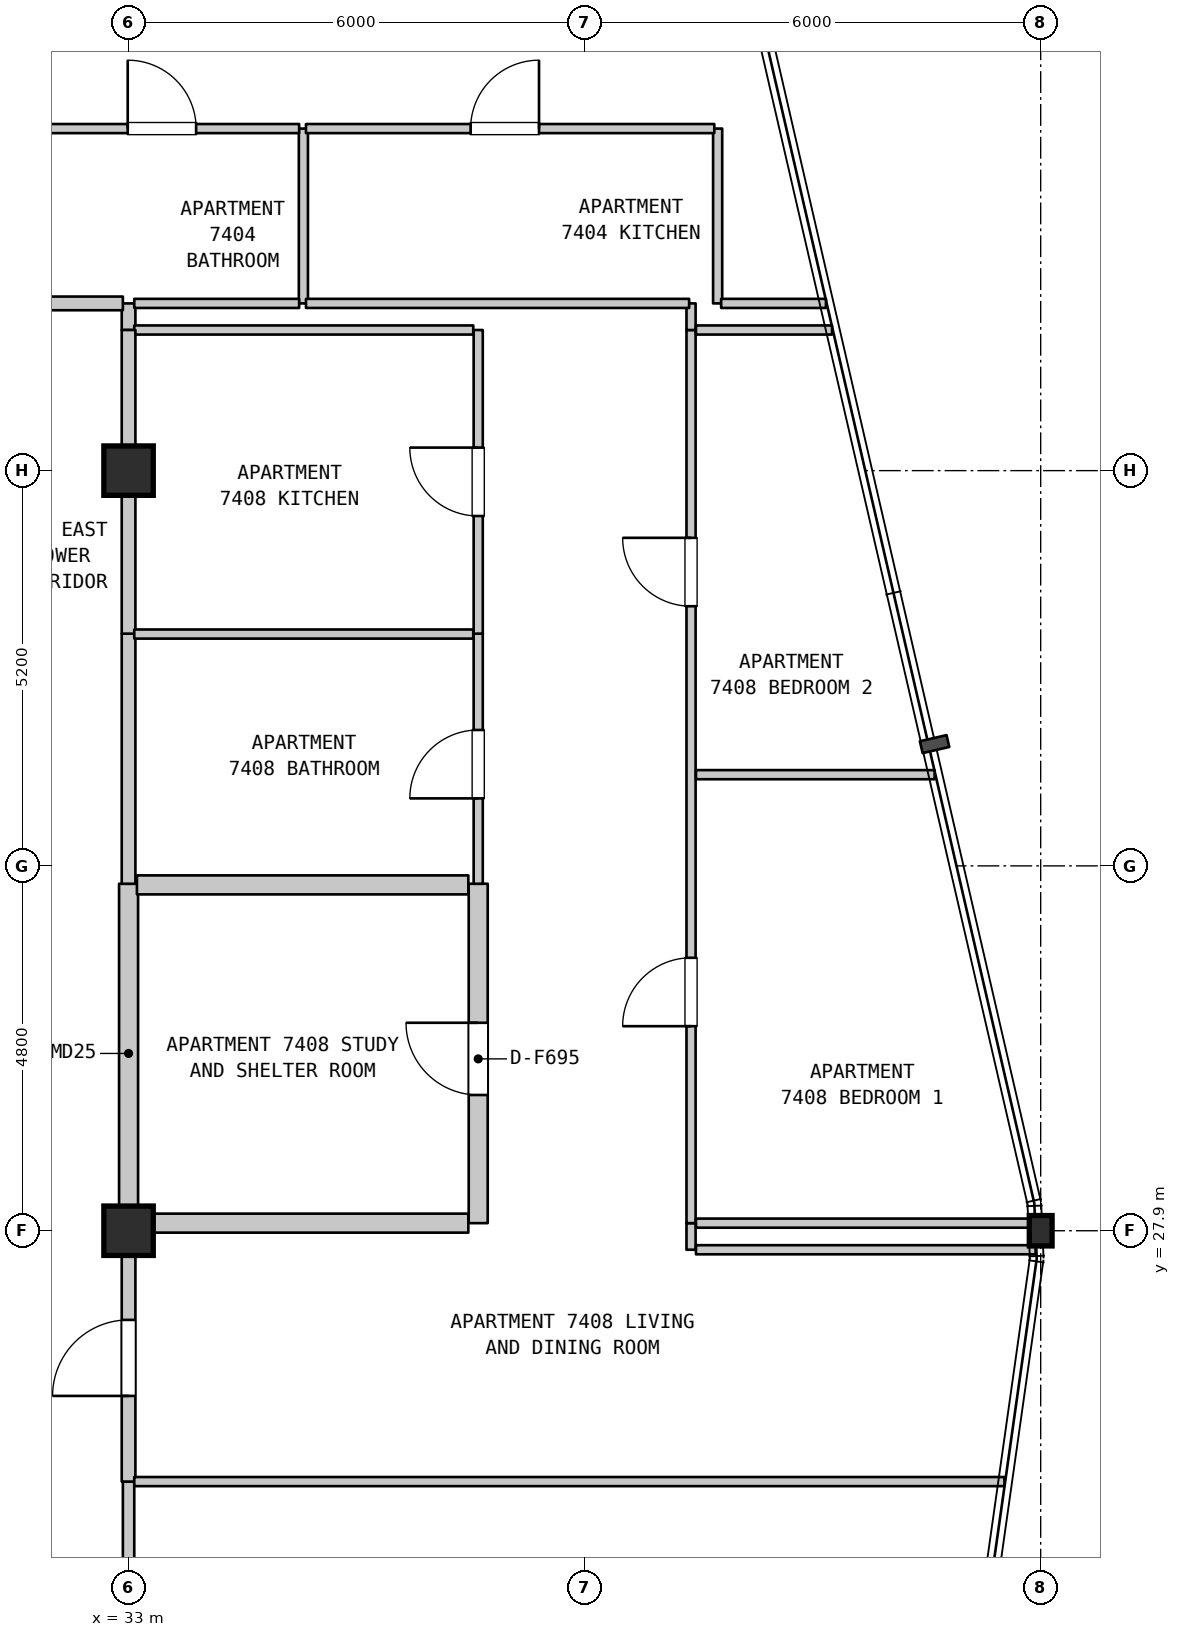
"""IFC4 building model, lengths in metres.
Left out: names, types, materials, properties, quantities, classifications, styles, units other than length and angle.
Written with IfcOpenShell. Run it as: python <this file> out.ifc"""

import sys

from ifc_helpers import new_model, si_unit, direction, frame, frame_2d, origin, origin_2d, place, context, subcontext, project, spatial, rectangle, i_section, extrude, element, fill, save


model = new_model("IFC4")
c1 = context("Model", 3, precision=1e-05, world=origin(), true_north=direction((0.0, 1.0)))
c2 = subcontext(c1, "Body", "Model", "MODEL_VIEW")
j1 = project(units=[si_unit("LENGTHUNIT", "METRE"), si_unit("PLANEANGLEUNIT", "RADIAN")], contexts=[c1])
p1 = place(None, origin())
s1 = spatial("IfcSite", under=j1, at=p1, CompositionType="ELEMENT")
p2 = place(p1, origin())
s2 = spatial("IfcBuilding", under=s1, at=p2, CompositionType="ELEMENT")
p3 = place(p2, frame((0.0, 0.0, 295.4)))
s3 = spatial("IfcBuildingStorey", under=s2, at=p3, CompositionType="ELEMENT", Elevation=295.4)
for number, where, z_axis, x_axis in (
    (1, (33.0, 27.9, 0.0), (0.0, 0.0, 1.0), (1.0, 0.0, 0.0)),
    (2, (33.0, 37.9, 0.0), (0.0, 0.0, 1.0), (1.0, 0.0, 0.0)),
):
    element("IfcColumn", number, at=place(p3, frame(where, z_axis=z_axis, x_axis=x_axis)), inside=s3, PredefinedType="COLUMN", context=c2, shape_type="SweptSolid", body=[
        extrude(rectangle(XDim=0.65, YDim=0.65, at=origin_2d()), origin(), (0.0, 0.0, 1.0), 3.7),
    ])
p4 = place(p3, frame((45.0, 27.9, 0.0), z_axis=(0.0, 0.0, 1.0), x_axis=(1.0, 0.0, 0.0)))
e3 = element("IfcColumn", 3, at=p4, inside=s3, PredefinedType="COLUMN", context=c2, shape_type="SweptSolid", body=[
    extrude(i_section(OverallWidth=0.3, OverallDepth=0.4, WebThickness=0.013, FlangeThickness=0.024, FilletRadius=0.027, at=origin_2d()), origin(), (0.0, 0.0, 1.0), 3.7),
])
p5 = place(p3, frame((33.0, 19.5, 0.0), z_axis=(0.0, 0.0, 1.0), x_axis=(0.0, 1.0, 0.0)))
e4 = element("IfcWall", 4, at=p5, inside=s3, PredefinedType="STANDARD", context=c2, shape_type="SweptSolid", body=[
    extrude(rectangle(XDim=5.1, YDim=0.15, at=frame_2d((2.55, 0.0))), origin(), (0.0, 0.0, 1.0), 3.09),
])
p6 = place(p5, frame((1.547, 0.0, 0.0)))
e5 = element("IfcOpeningElement", 5, at=p6, cuts=e4, PredefinedType="OPENING", context=c2, shape_type="SweptSolid", body=[
    extrude(rectangle(XDim=1.0, YDim=2.15, at=frame_2d((0.5, 1.075))), frame((0.0, 0.085, 0.0), z_axis=(0.0, -1.0, 0.0), x_axis=(1.0, 0.0, 0.0)), (0.0, 0.0, 1.0), 0.17),
])
p7 = place(p3, frame((33.0, 24.6, 0.0), z_axis=(0.0, 0.0, 1.0), x_axis=(0.0, 1.0, 0.0)))
e6 = element("IfcWall", 6, at=p7, inside=s3, PredefinedType="STANDARD", context=c2, shape_type="SweptSolid", body=[
    extrude(rectangle(XDim=3.4, YDim=0.18, at=frame_2d((1.7, 0.0))), origin(), (0.0, 0.0, 1.0), 3.09),
])
p8 = place(p7, frame((1.127, 0.0, 0.0)))
e7 = element("IfcOpeningElement", 7, at=p8, cuts=e6, PredefinedType="OPENING", context=c2, shape_type="SweptSolid", body=[
    extrude(rectangle(XDim=1.0, YDim=2.15, at=frame_2d((0.5, 1.075))), frame((0.0, 0.1, 0.0), z_axis=(0.0, -1.0, 0.0), x_axis=(1.0, 0.0, 0.0)), (0.0, 0.0, 1.0), 0.2),
])
p9 = place(p3, frame((33.0, 28.0, 0.0), z_axis=(0.0, 0.0, 1.0), x_axis=(0.0, 1.0, 0.0)))
e8 = element("IfcWall", 8, at=p9, inside=s3, PredefinedType="STANDARD", context=c2, shape_type="SweptSolid", body=[
    extrude(rectangle(XDim=4.465, YDim=0.25, at=frame_2d((2.232, 0.0))), origin(), (0.0, 0.0, 1.0), 2.88),
])
p10 = place(p3, frame((33.0, 32.465, 0.0), z_axis=(0.0, 0.0, 1.0), x_axis=(0.0, 1.0, 0.0)))
e9 = element("IfcWall", 9, at=p10, inside=s3, PredefinedType="STANDARD", context=c2, shape_type="SweptSolid", body=[
    extrude(rectangle(XDim=3.29, YDim=0.18, at=frame_2d((1.645, 0.0))), origin(), (0.0, 0.0, 1.0), 2.88),
])
p11 = place(p3, frame((33.0, 35.755, 0.0), z_axis=(0.0, 0.0, 1.0), x_axis=(0.0, 1.0, 0.0)))
e10 = element("IfcWall", 10, at=p11, inside=s3, PredefinedType="STANDARD", context=c2, shape_type="SweptSolid", body=[
    extrude(rectangle(XDim=2.145, YDim=0.18, at=frame_2d((1.073, 0.0))), origin(), (0.0, 0.0, 1.0), 2.88),
])
p12 = place(p3, frame((33.0, 39.75, 0.0), z_axis=(0.0, 0.0, 1.0), x_axis=(0.0, 1.0, 0.0)))
e11 = element("IfcWall", 11, at=p12, inside=s3, PredefinedType="STANDARD", context=c2, shape_type="SweptSolid", body=[
    extrude(rectangle(XDim=0.35, YDim=0.18, at=frame_2d((0.175, 0.0))), origin(), (0.0, 0.0, 1.0), 3.38),
])
p13 = place(p3, frame((35.3, 40.1, 0.0), z_axis=(0.0, 0.0, 1.0), x_axis=(0.0, 1.0, 0.0)))
e12 = element("IfcWall", 12, at=p13, inside=s3, PredefinedType="PARTITIONING", context=c2, shape_type="SweptSolid", body=[
    extrude(rectangle(XDim=2.3, YDim=0.12, at=frame_2d((1.15, 0.0))), origin(), (0.0, 0.0, 1.0), 3.38),
])
p14 = place(p3, frame((37.6, 28.0, 0.0), z_axis=(0.0, 0.0, 1.0), x_axis=(0.0, 1.0, 0.0)))
e13 = element("IfcWall", 13, at=p14, inside=s3, PredefinedType="STANDARD", context=c2, shape_type="SweptSolid", body=[
    extrude(rectangle(XDim=4.465, YDim=0.25, at=frame_2d((2.232, 0.0))), origin(), (0.0, 0.0, 1.0), 3.38),
])
p15 = place(p14, frame((1.686, 0.0, 0.0)))
e14 = element("IfcOpeningElement", 14, at=p15, cuts=e13, PredefinedType="OPENING", context=c2, shape_type="SweptSolid", body=[
    extrude(rectangle(XDim=0.95, YDim=2.15, at=frame_2d((0.475, 1.075))), frame((0.0, 0.135, 0.0), z_axis=(0.0, -1.0, 0.0), x_axis=(1.0, 0.0, 0.0)), (0.0, 0.0, 1.0), 0.27),
])
p16 = place(p3, frame((37.6, 32.465, 0.0), z_axis=(0.0, 0.0, 1.0), x_axis=(0.0, 1.0, 0.0)))
e15 = element("IfcWall", 15, at=p16, inside=s3, PredefinedType="PARTITIONING", context=c2, shape_type="SweptSolid", body=[
    extrude(rectangle(XDim=3.29, YDim=0.12, at=frame_2d((1.645, 0.0))), origin(), (0.0, 0.0, 1.0), 3.38),
])
p17 = place(p16, frame((1.123, 0.0, 0.0)))
e16 = element("IfcOpeningElement", 16, at=p17, cuts=e15, PredefinedType="OPENING", context=c2, shape_type="SweptSolid", body=[
    extrude(rectangle(XDim=0.9, YDim=2.1, at=frame_2d((0.45, 1.05))), frame((0.0, 0.07, 0.0), z_axis=(0.0, -1.0, 0.0), x_axis=(1.0, 0.0, 0.0)), (0.0, 0.0, 1.0), 0.14),
])
p18 = place(p3, frame((37.6, 35.755, 0.0), z_axis=(0.0, 0.0, 1.0), x_axis=(0.0, 1.0, 0.0)))
e17 = element("IfcWall", 17, at=p18, inside=s3, PredefinedType="PARTITIONING", context=c2, shape_type="SweptSolid", body=[
    extrude(rectangle(XDim=3.995, YDim=0.12, at=frame_2d((1.998, 0.0))), origin(), (0.0, 0.0, 1.0), 3.38),
])
p19 = place(p18, frame((1.548, 0.0, 0.0)))
e18 = element("IfcOpeningElement", 18, at=p19, cuts=e17, PredefinedType="OPENING", context=c2, shape_type="SweptSolid", body=[
    extrude(rectangle(XDim=0.9, YDim=2.15, at=frame_2d((0.45, 1.075))), frame((0.0, 0.07, 0.0), z_axis=(0.0, -1.0, 0.0), x_axis=(1.0, 0.0, 0.0)), (0.0, 0.0, 1.0), 0.14),
])
p20 = place(p3, frame((40.4, 27.65, 0.0), z_axis=(0.0, 0.0, 1.0), x_axis=(0.0, 1.0, 0.0)))
e19 = element("IfcWall", 19, at=p20, inside=s3, PredefinedType="PARTITIONING", context=c2, shape_type="SweptSolid", body=[
    extrude(rectangle(XDim=0.35, YDim=0.12, at=frame_2d((0.175, 0.0))), origin(), (0.0, 0.0, 1.0), 3.38),
])
p21 = place(p3, frame((40.4, 28.0, 0.0), z_axis=(0.0, 0.0, 1.0), x_axis=(0.0, 1.0, 0.0)))
e20 = element("IfcWall", 20, at=p21, inside=s3, PredefinedType="PARTITIONING", context=c2, shape_type="SweptSolid", body=[
    extrude(rectangle(XDim=11.75, YDim=0.12, at=frame_2d((5.875, 0.0))), origin(), (0.0, 0.0, 1.0), 3.38),
])
p22 = place(p21, frame((2.591, 0.0, 0.0)))
e21 = element("IfcOpeningElement", 21, at=p22, cuts=e20, PredefinedType="OPENING", context=c2, shape_type="SweptSolid", body=[
    extrude(rectangle(XDim=0.9, YDim=2.15, at=frame_2d((0.45, 1.075))), frame((0.0, 0.07, 0.0), z_axis=(0.0, -1.0, 0.0), x_axis=(1.0, 0.0, 0.0)), (0.0, 0.0, 1.0), 0.14),
])
p23 = place(p21, frame((8.116, 0.0, 0.0)))
e22 = element("IfcOpeningElement", 22, at=p23, cuts=e20, PredefinedType="OPENING", context=c2, shape_type="SweptSolid", body=[
    extrude(rectangle(XDim=0.9, YDim=2.15, at=frame_2d((0.45, 1.075))), frame((0.0, 0.07, 0.0), z_axis=(0.0, -1.0, 0.0), x_axis=(1.0, 0.0, 0.0)), (0.0, 0.0, 1.0), 0.14),
])
p24 = place(p3, frame((40.4, 39.75, 0.0), z_axis=(0.0, 0.0, 1.0), x_axis=(0.0, 1.0, 0.0)))
e23 = element("IfcWall", 23, at=p24, inside=s3, PredefinedType="PARTITIONING", context=c2, shape_type="SweptSolid", body=[
    extrude(rectangle(XDim=0.35, YDim=0.12, at=frame_2d((0.175, 0.0))), origin(), (0.0, 0.0, 1.0), 3.38),
])
p25 = place(p3, frame((40.75, 40.1, 0.0), z_axis=(0.0, 0.0, 1.0), x_axis=(0.0, 1.0, 0.0)))
e24 = element("IfcWall", 24, at=p25, inside=s3, PredefinedType="PARTITIONING", context=c2, shape_type="SweptSolid", body=[
    extrude(rectangle(XDim=2.3, YDim=0.12, at=frame_2d((1.15, 0.0))), origin(), (0.0, 0.0, 1.0), 3.38),
])
p26 = place(p3, frame((33.075, 24.6, 0.0), z_axis=(0.0, 0.0, 1.0), x_axis=(1.0, 0.0, 0.0)))
e25 = element("IfcWall", 25, at=p26, inside=s3, PredefinedType="PARTITIONING", context=c2, shape_type="SweptSolid", body=[
    extrude(rectangle(XDim=11.448, YDim=0.12, at=frame_2d((5.724, 0.0))), origin(), (0.0, 0.0, 1.0), 3.38),
])
p27 = place(p3, frame((40.465, 27.65, 0.0), z_axis=(0.0, 0.0, 1.0), x_axis=(1.0, 0.0, 0.0)))
e26 = element("IfcWall", 26, at=p27, inside=s3, PredefinedType="PARTITIONING", context=c2, shape_type="SweptSolid", body=[
    extrude(rectangle(XDim=4.468, YDim=0.12, at=frame_2d((2.234, 0.0))), origin(), (0.0, 0.0, 1.0), 3.38),
])
p28 = place(p3, frame((33.11, 28.0, 0.0), z_axis=(0.0, 0.0, 1.0), x_axis=(1.0, 0.0, 0.0)))
e27 = element("IfcWall", 27, at=p28, inside=s3, PredefinedType="STANDARD", context=c2, shape_type="SweptSolid", body=[
    extrude(rectangle(XDim=4.36, YDim=0.25, at=frame_2d((2.18, 0.0))), origin(), (0.0, 0.0, 1.0), 2.88),
])
p29 = place(p3, frame((40.465, 28.0, 0.0), z_axis=(0.0, 0.0, 1.0), x_axis=(1.0, 0.0, 0.0)))
e28 = element("IfcWall", 28, at=p29, inside=s3, PredefinedType="PARTITIONING", context=c2, shape_type="SweptSolid", body=[
    extrude(rectangle(XDim=4.452, YDim=0.12, at=frame_2d((2.226, 0.0))), origin(), (0.0, 0.0, 1.0), 2.88),
])
p30 = place(p3, frame((33.11, 32.45, 0.0), z_axis=(0.0, 0.0, 1.0), x_axis=(1.0, 0.0, 0.0)))
e29 = element("IfcWall", 29, at=p30, inside=s3, PredefinedType="STANDARD", context=c2, shape_type="SweptSolid", body=[
    extrude(rectangle(XDim=4.36, YDim=0.25, at=frame_2d((2.18, 0.0))), origin(), (0.0, 0.0, 1.0), 3.38),
])
p31 = place(p3, frame((40.465, 33.9, 0.0), z_axis=(0.0, 0.0, 1.0), x_axis=(1.0, 0.0, 0.0)))
e30 = element("IfcWall", 30, at=p31, inside=s3, PredefinedType="PARTITIONING", context=c2, shape_type="SweptSolid", body=[
    extrude(rectangle(XDim=3.14, YDim=0.12, at=frame_2d((1.57, 0.0))), origin(), (0.0, 0.0, 1.0), 3.38),
])
for number, where, z_axis, x_axis in (
    (31, (33.075, 35.75, 0.0), (0.0, 0.0, 1.0), (1.0, 0.0, 0.0)),
    (32, (33.075, 39.75, 0.0), (0.0, 0.0, 1.0), (1.0, 0.0, 0.0)),
):
    element("IfcWall", number, at=place(p3, frame(where, z_axis=z_axis, x_axis=x_axis)), inside=s3, PredefinedType="PARTITIONING", context=c2, shape_type="SweptSolid", body=[
        extrude(rectangle(XDim=4.46, YDim=0.12, at=frame_2d((2.23, 0.0))), origin(), (0.0, 0.0, 1.0), 3.38),
    ])
p32 = place(p3, frame((40.465, 39.75, 0.0), z_axis=(0.0, 0.0, 1.0), x_axis=(1.0, 0.0, 0.0)))
e33 = element("IfcWall", 33, at=p32, inside=s3, PredefinedType="PARTITIONING", context=c2, shape_type="SweptSolid", body=[
    extrude(rectangle(XDim=1.79, YDim=0.12, at=frame_2d((0.895, 0.0))), origin(), (0.0, 0.0, 1.0), 3.38),
])
p33 = place(p3, frame((31.843, 40.1, 0.0), z_axis=(0.0, 0.0, 1.0), x_axis=(1.0, 0.0, 0.0)))
e34 = element("IfcWall", 34, at=p33, inside=s3, PredefinedType="STANDARD", context=c2, shape_type="SweptSolid", body=[
    extrude(rectangle(XDim=1.082, YDim=0.18, at=frame_2d((0.541, 0.0))), origin(), (0.0, 0.0, 1.0), 3.38),
])
p34 = place(p3, frame((33.075, 40.1, 0.0), z_axis=(0.0, 0.0, 1.0), x_axis=(1.0, 0.0, 0.0)))
e35 = element("IfcWall", 35, at=p34, inside=s3, PredefinedType="PARTITIONING", context=c2, shape_type="SweptSolid", body=[
    extrude(rectangle(XDim=2.169, YDim=0.12, at=frame_2d((1.084, 0.0))), origin(), (0.0, 0.0, 1.0), 3.38),
])
p35 = place(p3, frame((35.334, 40.1, 0.0), z_axis=(0.0, 0.0, 1.0), x_axis=(1.0, 0.0, 0.0)))
e36 = element("IfcWall", 36, at=p35, inside=s3, PredefinedType="PARTITIONING", context=c2, shape_type="SweptSolid", body=[
    extrude(rectangle(XDim=5.041, YDim=0.12, at=frame_2d((2.521, 0.0))), origin(), (0.0, 0.0, 1.0), 3.38),
])
p36 = place(p3, frame((40.796, 40.1, 0.0), z_axis=(0.0, 0.0, 1.0), x_axis=(1.0, 0.0, 0.0)))
e37 = element("IfcWall", 37, at=p36, inside=s3, PredefinedType="PARTITIONING", context=c2, shape_type="SweptSolid", body=[
    extrude(rectangle(XDim=1.379, YDim=0.12, at=frame_2d((0.689, 0.0))), origin(), (0.0, 0.0, 1.0), 3.38),
])
p37 = place(p3, frame((31.843, 42.4, 0.0), z_axis=(0.0, 0.0, 1.0), x_axis=(1.0, 0.0, 0.0)))
e38 = element("IfcWall", 38, at=p37, inside=s3, PredefinedType="PARTITIONING", context=c2, shape_type="SweptSolid", body=[
    extrude(rectangle(XDim=3.401, YDim=0.12, at=frame_2d((1.7, 0.0))), origin(), (0.0, 0.0, 1.0), 3.38),
])
p38 = place(p37, frame((1.146, 0.0, 0.0)))
e39 = element("IfcOpeningElement", 39, at=p38, cuts=e38, PredefinedType="OPENING", context=c2, shape_type="SweptSolid", body=[
    extrude(rectangle(XDim=0.9, YDim=2.1, at=frame_2d((0.45, 1.05))), frame((0.0, 0.07, 0.0), z_axis=(0.0, -1.0, 0.0), x_axis=(1.0, 0.0, 0.0)), (0.0, 0.0, 1.0), 0.14),
])
p39 = place(p3, frame((35.334, 42.4, 0.0), z_axis=(0.0, 0.0, 1.0), x_axis=(1.0, 0.0, 0.0)))
e40 = element("IfcWall", 40, at=p39, inside=s3, PredefinedType="PARTITIONING", context=c2, shape_type="SweptSolid", body=[
    extrude(rectangle(XDim=5.372, YDim=0.12, at=frame_2d((2.686, 0.0))), origin(), (0.0, 0.0, 1.0), 3.38),
])
p40 = place(p39, frame((2.166, 0.0, 0.0)))
e41 = element("IfcOpeningElement", 41, at=p40, cuts=e40, PredefinedType="OPENING", context=c2, shape_type="SweptSolid", body=[
    extrude(rectangle(XDim=0.9, YDim=2.15, at=frame_2d((0.45, 1.075))), frame((0.0, 0.07, 0.0), z_axis=(0.0, -1.0, 0.0), x_axis=(1.0, 0.0, 0.0)), (0.0, 0.0, 1.0), 0.14),
])
p41 = place(p3, frame((33.0, 37.9, 0.0), z_axis=(0.0, 0.0, 1.0), x_axis=(0.0, 1.0, 0.0)))
e42 = element("IfcWall", 42, at=p41, inside=s3, PredefinedType="STANDARD", context=c2, shape_type="SweptSolid", body=[
    extrude(rectangle(XDim=1.85, YDim=0.18, at=frame_2d((0.925, 0.0))), origin(), (0.0, 0.0, 1.0), 2.78),
])
p42 = place(p8, origin())
e43 = element("IfcDoor", 43, at=p42, inside=s3, OperationType="SINGLE_SWING_LEFT", PredefinedType="DOOR", context=c2, shape_type="SweptSolid", body=[
    extrude(rectangle(XDim=1.0, YDim=2.15, at=frame_2d((0.5, 1.075))), frame((0.0, 0.025, 0.0), z_axis=(0.0, -1.0, 0.0), x_axis=(1.0, 0.0, 0.0)), (0.0, 0.0, 1.0), 0.05),
])
fill(e7, e43)
p43 = place(p15, origin())
e44 = element("IfcDoor", 44, at=p43, inside=s3, OperationType="SINGLE_SWING_RIGHT", PredefinedType="DOOR", context=c2, shape_type="SweptSolid", body=[
    extrude(rectangle(XDim=0.95, YDim=2.15, at=frame_2d((0.475, 1.075))), frame((0.0, 0.025, 0.0), z_axis=(0.0, -1.0, 0.0), x_axis=(1.0, 0.0, 0.0)), (0.0, 0.0, 1.0), 0.05),
])
fill(e14, e44)
p44 = place(p17, origin())
e45 = element("IfcDoor", 45, at=p44, inside=s3, OperationType="SINGLE_SWING_LEFT", PredefinedType="DOOR", context=c2, shape_type="SweptSolid", body=[
    extrude(rectangle(XDim=0.9, YDim=2.1, at=frame_2d((0.45, 1.05))), frame((0.0, 0.025, 0.0), z_axis=(0.0, -1.0, 0.0), x_axis=(1.0, 0.0, 0.0)), (0.0, 0.0, 1.0), 0.05),
])
fill(e16, e45)
p45 = place(p19, origin())
e46 = element("IfcDoor", 46, at=p45, inside=s3, OperationType="SINGLE_SWING_RIGHT", PredefinedType="DOOR", context=c2, shape_type="SweptSolid", body=[
    extrude(rectangle(XDim=0.9, YDim=2.15, at=frame_2d((0.45, 1.075))), frame((0.0, 0.025, 0.0), z_axis=(0.0, -1.0, 0.0), x_axis=(1.0, 0.0, 0.0)), (0.0, 0.0, 1.0), 0.05),
])
fill(e18, e46)
p46 = place(p22, origin())
e47 = element("IfcDoor", 47, at=p46, inside=s3, OperationType="SINGLE_SWING_LEFT", PredefinedType="DOOR", context=c2, shape_type="SweptSolid", body=[
    extrude(rectangle(XDim=0.9, YDim=2.15, at=frame_2d((0.45, 1.075))), frame((0.0, 0.025, 0.0), z_axis=(0.0, -1.0, 0.0), x_axis=(1.0, 0.0, 0.0)), (0.0, 0.0, 1.0), 0.05),
])
fill(e21, e47)
p47 = place(p23, origin())
e48 = element("IfcDoor", 48, at=p47, inside=s3, OperationType="SINGLE_SWING_RIGHT", PredefinedType="DOOR", context=c2, shape_type="SweptSolid", body=[
    extrude(rectangle(XDim=0.9, YDim=2.15, at=frame_2d((0.45, 1.075))), frame((0.0, 0.025, 0.0), z_axis=(0.0, -1.0, 0.0), x_axis=(1.0, 0.0, 0.0)), (0.0, 0.0, 1.0), 0.05),
])
fill(e22, e48)
p48 = place(p38, origin())
e49 = element("IfcDoor", 49, at=p48, inside=s3, OperationType="SINGLE_SWING_LEFT", PredefinedType="DOOR", context=c2, shape_type="SweptSolid", body=[
    extrude(rectangle(XDim=0.9, YDim=2.1, at=frame_2d((0.45, 1.05))), frame((0.0, 0.025, 0.0), z_axis=(0.0, -1.0, 0.0), x_axis=(1.0, 0.0, 0.0)), (0.0, 0.0, 1.0), 0.05),
])
fill(e39, e49)
p49 = place(p40, origin())
e50 = element("IfcDoor", 50, at=p49, inside=s3, OperationType="SINGLE_SWING_RIGHT", PredefinedType="DOOR", context=c2, shape_type="SweptSolid", body=[
    extrude(rectangle(XDim=0.9, YDim=2.15, at=frame_2d((0.45, 1.075))), frame((0.0, 0.025, 0.0), z_axis=(0.0, -1.0, 0.0), x_axis=(1.0, 0.0, 0.0)), (0.0, 0.0, 1.0), 0.05),
])
fill(e41, e50)
save(model, sys.argv[1])
